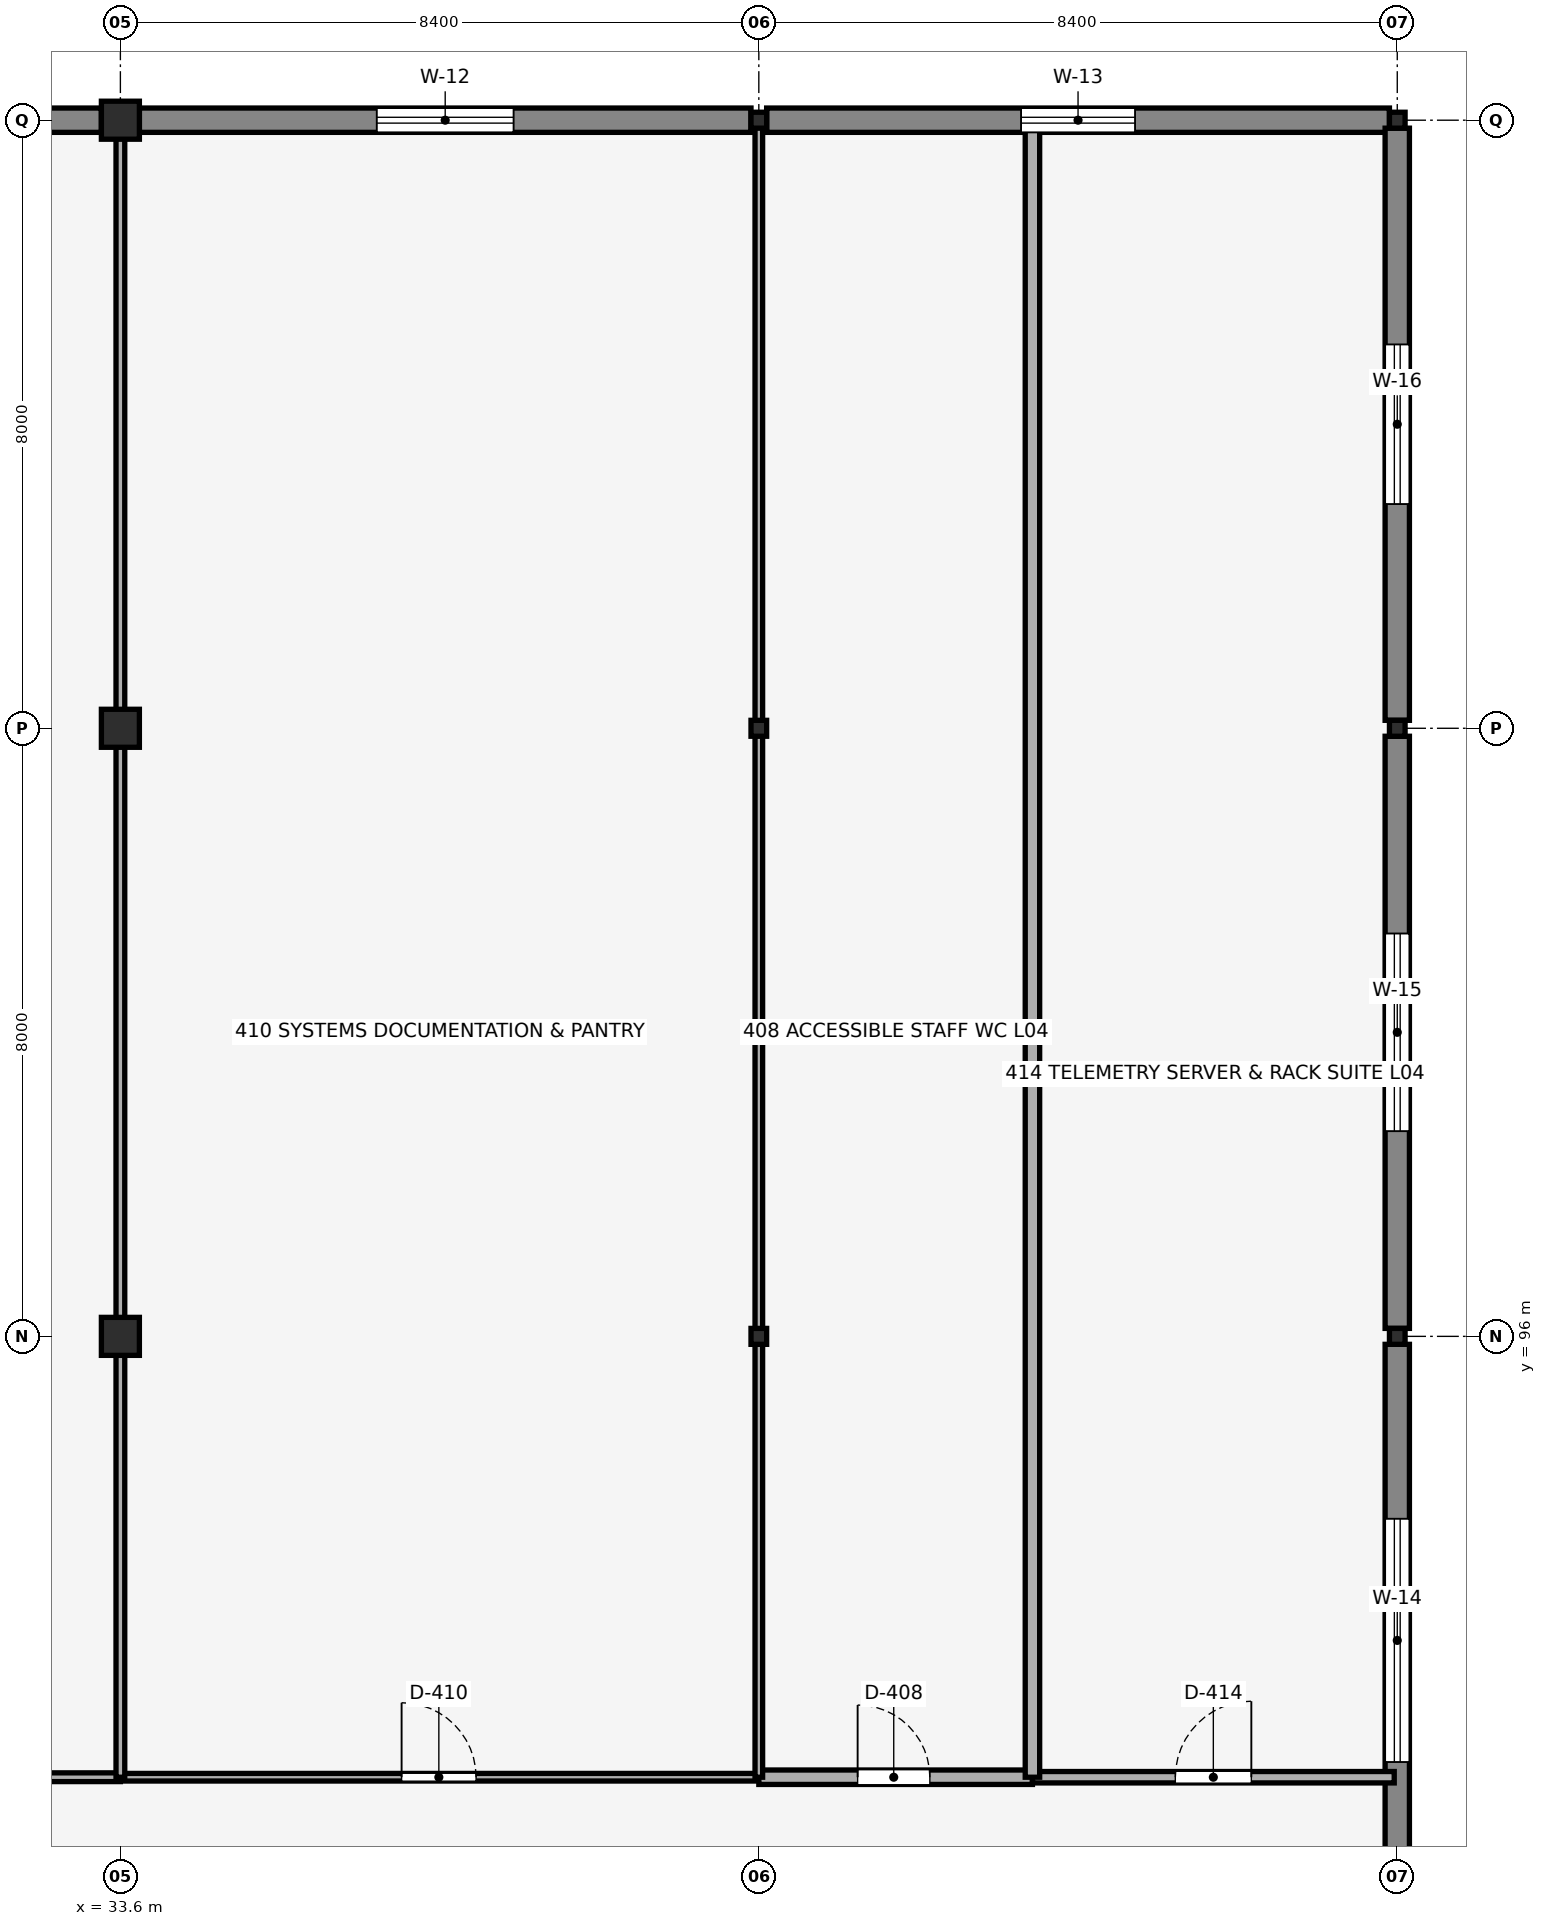
"""IFC4 building model, lengths in metres.
Left out: names, types, materials, properties, quantities, classifications, styles, units other than length and angle.
Written with IfcOpenShell. Run it as: python <this file> out.ifc"""

import sys

from ifc_helpers import new_model, si_unit, direction, frame, frame_2d, origin, origin_2d, place, context, subcontext, project, spatial, rectangle, i_section, extrude, element, fill, save


model = new_model("IFC4")
c1 = context("Model", 3, precision=1e-05, world=origin(), true_north=direction((0.0, 1.0)))
c2 = subcontext(c1, "Body", "Model", "MODEL_VIEW")
j1 = project(units=[si_unit("LENGTHUNIT", "METRE"), si_unit("PLANEANGLEUNIT", "RADIAN")], contexts=[c1])
p1 = place(None, origin())
s1 = spatial("IfcSite", under=j1, at=p1, CompositionType="ELEMENT")
p2 = place(p1, origin())
s2 = spatial("IfcBuilding", under=s1, at=p2, CompositionType="ELEMENT")
p3 = place(p2, frame((0.0, 0.0, 17.2)))
s3 = spatial("IfcBuildingStorey", under=s2, at=p3, CompositionType="ELEMENT", Elevation=17.2)
for number, where, z_axis, x_axis in (
    (1, (33.6, 96.0, 0.0), (0.0, 0.0, 1.0), (1.0, 0.0, 0.0)),
    (2, (33.6, 104.0, 0.0), (0.0, 0.0, 1.0), (1.0, 0.0, 0.0)),
    (3, (33.6, 112.0, 0.0), (0.0, 0.0, 1.0), (1.0, 0.0, 0.0)),
):
    element("IfcColumn", number, at=place(p3, frame(where, z_axis=z_axis, x_axis=x_axis)), inside=s3, PredefinedType="COLUMN", context=c2, shape_type="SweptSolid", body=[
        extrude(rectangle(XDim=0.5, YDim=0.5, at=origin_2d()), origin(), (0.0, 0.0, 1.0), 3.59),
    ])
for number, where, z_axis, x_axis in (
    (4, (42.0, 96.0, 0.0), (0.0, 0.0, 1.0), (1.0, 0.0, 0.0)),
    (5, (42.0, 104.0, 0.0), (0.0, 0.0, 1.0), (1.0, 0.0, 0.0)),
    (6, (42.0, 112.0, 0.0), (0.0, 0.0, 1.0), (1.0, 0.0, 0.0)),
    (7, (50.4, 96.0, 0.0), (0.0, 0.0, 1.0), (1.0, 0.0, 0.0)),
    (8, (50.4, 104.0, 0.0), (0.0, 0.0, 1.0), (1.0, 0.0, 0.0)),
    (9, (50.4, 112.0, 0.0), (0.0, 0.0, 1.0), (1.0, 0.0, 0.0)),
):
    element("IfcColumn", number, at=place(p3, frame(where, z_axis=z_axis, x_axis=x_axis)), inside=s3, PredefinedType="COLUMN", context=c2, shape_type="SweptSolid", body=[
        extrude(i_section(OverallWidth=0.206, OverallDepth=0.21, WebThickness=0.01, FlangeThickness=0.014, FilletRadius=0.01, at=origin_2d()), origin(), (0.0, 0.0, 1.0), 3.59),
    ])
p4 = place(p3, frame((25.303, 112.0, 0.0), z_axis=(0.0, 0.0, 1.0), x_axis=(1.0, 0.0, 0.0)))
e10 = element("IfcWall", 10, at=p4, inside=s3, PredefinedType="SOLIDWALL", context=c2, shape_type="SweptSolid", body=[
    extrude(rectangle(XDim=8.047, YDim=0.32, at=frame_2d((4.023, 0.0))), origin(), (0.0, 0.0, 1.0), 3.33),
])
p5 = place(p4, frame((3.124, 0.0, 0.9), z_axis=(0.0, 0.0, 1.0), x_axis=(1.0, 0.0, 0.0)))
e11 = element("IfcOpeningElement", 11, at=p5, cuts=e10, PredefinedType="OPENING", context=c2, shape_type="SweptSolid", body=[
    extrude(rectangle(XDim=1.8, YDim=1.45, at=frame_2d((0.9, 0.725))), frame((0.0, 0.17, 0.0), z_axis=(0.0, -1.0, 0.0), x_axis=(1.0, 0.0, 0.0)), (0.0, 0.0, 1.0), 0.34),
])
p6 = place(p3, frame((33.85, 112.0, 0.0), z_axis=(0.0, 0.0, 1.0), x_axis=(1.0, 0.0, 0.0)))
e12 = element("IfcWall", 12, at=p6, inside=s3, PredefinedType="SOLIDWALL", context=c2, shape_type="SweptSolid", body=[
    extrude(rectangle(XDim=8.047, YDim=0.32, at=frame_2d((4.023, 0.0))), origin(), (0.0, 0.0, 1.0), 3.33),
])
p7 = place(p6, frame((3.124, 0.0, 0.9), z_axis=(0.0, 0.0, 1.0), x_axis=(1.0, 0.0, 0.0)))
e13 = element("IfcOpeningElement", 13, at=p7, cuts=e12, PredefinedType="OPENING", context=c2, shape_type="SweptSolid", body=[
    extrude(rectangle(XDim=1.8, YDim=1.3, at=frame_2d((0.9, 0.65))), frame((0.0, 0.17, 0.0), z_axis=(0.0, -1.0, 0.0), x_axis=(1.0, 0.0, 0.0)), (0.0, 0.0, 1.0), 0.34),
])
p8 = place(p3, frame((42.103, 112.0, 0.0), z_axis=(0.0, 0.0, 1.0), x_axis=(1.0, 0.0, 0.0)))
e14 = element("IfcWall", 14, at=p8, inside=s3, PredefinedType="SOLIDWALL", context=c2, shape_type="SweptSolid", body=[
    extrude(rectangle(XDim=8.194, YDim=0.32, at=frame_2d((4.097, 0.0))), origin(), (0.0, 0.0, 1.0), 3.33),
])
p9 = place(p8, frame((3.347, 0.0, 0.9), z_axis=(0.0, 0.0, 1.0), x_axis=(1.0, 0.0, 0.0)))
e15 = element("IfcOpeningElement", 15, at=p9, cuts=e14, PredefinedType="OPENING", context=c2, shape_type="SweptSolid", body=[
    extrude(rectangle(XDim=1.5, YDim=1.4, at=frame_2d((0.75, 0.7))), frame((0.0, 0.17, 0.0), z_axis=(0.0, -1.0, 0.0), x_axis=(1.0, 0.0, 0.0)), (0.0, 0.0, 1.0), 0.34),
])
p10 = place(p3, frame((50.4, 88.105, 0.0), z_axis=(0.0, 0.0, 1.0), x_axis=(0.0, 1.0, 0.0)))
e16 = element("IfcWall", 16, at=p10, inside=s3, PredefinedType="SOLIDWALL", context=c2, shape_type="SweptSolid", body=[
    extrude(rectangle(XDim=7.791, YDim=0.32, at=frame_2d((3.895, 0.0))), origin(), (0.0, 0.0, 1.0), 3.29),
])
p11 = place(p10, frame((2.295, 0.0, 1.55), z_axis=(0.0, 0.0, 1.0), x_axis=(1.0, 0.0, 0.0)))
e17 = element("IfcOpeningElement", 17, at=p11, cuts=e16, PredefinedType="OPENING", context=c2, shape_type="SweptSolid", body=[
    extrude(rectangle(XDim=3.2, YDim=0.9, at=frame_2d((1.6, 0.45))), frame((0.0, 0.17, 0.0), z_axis=(0.0, -1.0, 0.0), x_axis=(1.0, 0.0, 0.0)), (0.0, 0.0, 1.0), 0.34),
])
p12 = place(p3, frame((50.4, 96.105, 0.0), z_axis=(0.0, 0.0, 1.0), x_axis=(0.0, 1.0, 0.0)))
e18 = element("IfcWall", 18, at=p12, inside=s3, PredefinedType="SOLIDWALL", context=c2, shape_type="SweptSolid", body=[
    extrude(rectangle(XDim=7.791, YDim=0.32, at=frame_2d((3.895, 0.0))), origin(), (0.0, 0.0, 1.0), 3.29),
])
p13 = place(p12, frame((2.595, 0.0, 1.55), z_axis=(0.0, 0.0, 1.0), x_axis=(1.0, 0.0, 0.0)))
e19 = element("IfcOpeningElement", 19, at=p13, cuts=e18, PredefinedType="OPENING", context=c2, shape_type="SweptSolid", body=[
    extrude(rectangle(XDim=2.6, YDim=0.85, at=frame_2d((1.3, 0.425))), frame((0.0, 0.17, 0.0), z_axis=(0.0, -1.0, 0.0), x_axis=(1.0, 0.0, 0.0)), (0.0, 0.0, 1.0), 0.34),
])
p14 = place(p3, frame((50.4, 104.105, 0.0), z_axis=(0.0, 0.0, 1.0), x_axis=(0.0, 1.0, 0.0)))
e20 = element("IfcWall", 20, at=p14, inside=s3, PredefinedType="SOLIDWALL", context=c2, shape_type="SweptSolid", body=[
    extrude(rectangle(XDim=7.791, YDim=0.32, at=frame_2d((3.895, 0.0))), origin(), (0.0, 0.0, 1.0), 3.29),
])
p15 = place(p14, frame((2.845, 0.0, 1.55), z_axis=(0.0, 0.0, 1.0), x_axis=(1.0, 0.0, 0.0)))
e21 = element("IfcOpeningElement", 21, at=p15, cuts=e20, PredefinedType="OPENING", context=c2, shape_type="SweptSolid", body=[
    extrude(rectangle(XDim=2.1, YDim=0.8, at=frame_2d((1.05, 0.4))), frame((0.0, 0.17, 0.0), z_axis=(0.0, -1.0, 0.0), x_axis=(1.0, 0.0, 0.0)), (0.0, 0.0, 1.0), 0.34),
])
p16 = place(p3, frame((16.8, 90.2, 0.0), z_axis=(0.0, 0.0, 1.0), x_axis=(1.0, 0.0, 0.0)))
e22 = element("IfcWall", 22, at=p16, inside=s3, PredefinedType="PARTITIONING", context=c2, shape_type="SweptSolid", body=[
    extrude(rectangle(XDim=16.8, YDim=0.115, at=frame_2d((8.4, 0.0))), origin(), (0.0, 0.0, 1.0), 3.137),
])
p17 = place(p16, frame((3.7, 0.0, 0.0), z_axis=(0.0, 0.0, 1.0), x_axis=(1.0, 0.0, 0.0)))
e23 = element("IfcOpeningElement", 23, at=p17, cuts=e22, PredefinedType="OPENING", context=c2, shape_type="SweptSolid", body=[
    extrude(rectangle(XDim=0.88, YDim=2.1, at=frame_2d((0.44, 1.05))), frame((0.0, 0.067, 0.0), z_axis=(0.0, -1.0, 0.0), x_axis=(1.0, 0.0, 0.0)), (0.0, 0.0, 1.0), 0.135),
])
p18 = place(p3, frame((33.6, 90.2, 0.0), z_axis=(0.0, 0.0, 1.0), x_axis=(1.0, 0.0, 0.0)))
e24 = element("IfcWall", 24, at=p18, inside=s3, PredefinedType="PARTITIONING", context=c2, shape_type="SweptSolid", body=[
    extrude(rectangle(XDim=8.4, YDim=0.1, at=frame_2d((4.2, 0.0))), origin(), (0.0, 0.0, 1.0), 3.59),
])
p19 = place(p18, frame((3.7, 0.0, 0.0), z_axis=(0.0, 0.0, 1.0), x_axis=(1.0, 0.0, 0.0)))
e25 = element("IfcOpeningElement", 25, at=p19, cuts=e24, PredefinedType="OPENING", context=c2, shape_type="SweptSolid", body=[
    extrude(rectangle(XDim=0.98, YDim=2.15, at=frame_2d((0.49, 1.075))), frame((0.0, 0.06, 0.0), z_axis=(0.0, -1.0, 0.0), x_axis=(1.0, 0.0, 0.0)), (0.0, 0.0, 1.0), 0.12),
])
p20 = place(p3, frame((42.0, 90.2, 0.0), z_axis=(0.0, 0.0, 1.0), x_axis=(1.0, 0.0, 0.0)))
e26 = element("IfcWall", 26, at=p20, inside=s3, PredefinedType="PLUMBINGWALL", context=c2, shape_type="SweptSolid", body=[
    extrude(rectangle(XDim=3.6, YDim=0.19, at=frame_2d((1.8, 0.0))), origin(), (0.0, 0.0, 1.0), 3.59),
])
p21 = place(p20, frame((1.3, 0.0, 0.0), z_axis=(0.0, 0.0, 1.0), x_axis=(1.0, 0.0, 0.0)))
e27 = element("IfcOpeningElement", 27, at=p21, cuts=e26, PredefinedType="OPENING", context=c2, shape_type="SweptSolid", body=[
    extrude(rectangle(XDim=0.95, YDim=2.15, at=frame_2d((0.475, 1.075))), frame((0.0, 0.105, 0.0), z_axis=(0.0, -1.0, 0.0), x_axis=(1.0, 0.0, 0.0)), (0.0, 0.0, 1.0), 0.21),
])
p22 = place(p3, frame((45.6, 90.2, 0.0), z_axis=(0.0, 0.0, 1.0), x_axis=(1.0, 0.0, 0.0)))
e28 = element("IfcWall", 28, at=p22, inside=s3, PredefinedType="PARTITIONING", context=c2, shape_type="SweptSolid", body=[
    extrude(rectangle(XDim=4.76, YDim=0.15, at=frame_2d((2.38, 0.0))), origin(), (0.0, 0.0, 1.0), 3.59),
])
p23 = place(p22, frame((1.88, 0.0, 0.0), z_axis=(0.0, 0.0, 1.0), x_axis=(1.0, 0.0, 0.0)))
e29 = element("IfcOpeningElement", 29, at=p23, cuts=e28, PredefinedType="OPENING", context=c2, shape_type="SweptSolid", body=[
    extrude(rectangle(XDim=1.0, YDim=2.15, at=frame_2d((0.5, 1.075))), frame((0.0, 0.085, 0.0), z_axis=(0.0, -1.0, 0.0), x_axis=(1.0, 0.0, 0.0)), (0.0, 0.0, 1.0), 0.17),
])
p24 = place(p3, frame((33.6, 90.2, 0.0), z_axis=(0.0, 0.0, 1.0), x_axis=(0.0, 1.0, 0.0)))
e30 = element("IfcWall", 30, at=p24, inside=s3, PredefinedType="PARTITIONING", context=c2, shape_type="SweptSolid", body=[
    extrude(rectangle(XDim=5.56, YDim=0.115, at=frame_2d((2.78, 0.0))), origin(), (0.0, 0.0, 1.0), 3.137),
])
for number, where, z_axis, x_axis in (
    (31, (33.6, 96.24, 0.0), (0.0, 0.0, 1.0), (0.0, 1.0, 0.0)),
    (32, (33.6, 104.24, 0.0), (0.0, 0.0, 1.0), (0.0, 1.0, 0.0)),
):
    element("IfcWall", number, at=place(p3, frame(where, z_axis=z_axis, x_axis=x_axis)), inside=s3, PredefinedType="PARTITIONING", context=c2, shape_type="SweptSolid", body=[
        extrude(rectangle(XDim=7.52, YDim=0.115, at=frame_2d((3.76, 0.0))), origin(), (0.0, 0.0, 1.0), 3.137),
    ])
p25 = place(p3, frame((42.0, 90.2, 0.0), z_axis=(0.0, 0.0, 1.0), x_axis=(0.0, 1.0, 0.0)))
e33 = element("IfcWall", 33, at=p25, inside=s3, PredefinedType="PARTITIONING", context=c2, shape_type="SweptSolid", body=[
    extrude(rectangle(XDim=5.705, YDim=0.1, at=frame_2d((2.853, 0.0))), origin(), (0.0, 0.0, 1.0), 3.137),
])
for number, where, z_axis, x_axis in (
    (34, (42.0, 96.095, 0.0), (0.0, 0.0, 1.0), (0.0, 1.0, 0.0)),
    (35, (42.0, 104.095, 0.0), (0.0, 0.0, 1.0), (0.0, 1.0, 0.0)),
):
    element("IfcWall", number, at=place(p3, frame(where, z_axis=z_axis, x_axis=x_axis)), inside=s3, PredefinedType="PARTITIONING", context=c2, shape_type="SweptSolid", body=[
        extrude(rectangle(XDim=7.811, YDim=0.1, at=frame_2d((3.905, 0.0))), origin(), (0.0, 0.0, 1.0), 3.137),
    ])
p26 = place(p3, frame((45.6, 90.2, 0.0), z_axis=(0.0, 0.0, 1.0), x_axis=(0.0, 1.0, 0.0)))
e36 = element("IfcWall", 36, at=p26, inside=s3, PredefinedType="PLUMBINGWALL", context=c2, shape_type="SweptSolid", body=[
    extrude(rectangle(XDim=21.76, YDim=0.19, at=frame_2d((10.88, 0.0))), origin(), (0.0, 0.0, 1.0), 3.59),
])
p27 = place(p7, origin())
e37 = element("IfcWindow", 37, at=p27, inside=s3, PartitioningType="DOUBLE_PANEL_VERTICAL", PredefinedType="WINDOW", context=c2, shape_type="SweptSolid", body=[
    extrude(rectangle(XDim=1.8, YDim=1.3, at=frame_2d((0.9, 0.65))), frame((0.0, 0.03, 0.0), z_axis=(0.0, -1.0, 0.0), x_axis=(1.0, 0.0, 0.0)), (0.0, 0.0, 1.0), 0.06),
])
fill(e13, e37)
p28 = place(p9, origin())
e38 = element("IfcWindow", 38, at=p28, inside=s3, PartitioningType="SINGLE_PANEL", PredefinedType="WINDOW", context=c2, shape_type="SweptSolid", body=[
    extrude(rectangle(XDim=1.5, YDim=1.4, at=frame_2d((0.75, 0.7))), frame((0.0, 0.03, 0.0), z_axis=(0.0, -1.0, 0.0), x_axis=(1.0, 0.0, 0.0)), (0.0, 0.0, 1.0), 0.06),
])
fill(e15, e38)
p29 = place(p11, origin())
e39 = element("IfcWindow", 39, at=p29, inside=s3, PartitioningType="TRIPLE_PANEL_HORIZONTAL", PredefinedType="WINDOW", context=c2, shape_type="SweptSolid", body=[
    extrude(rectangle(XDim=3.2, YDim=0.9, at=frame_2d((1.6, 0.45))), frame((0.0, 0.03, 0.0), z_axis=(0.0, -1.0, 0.0), x_axis=(1.0, 0.0, 0.0)), (0.0, 0.0, 1.0), 0.06),
])
fill(e17, e39)
p30 = place(p13, origin())
e40 = element("IfcWindow", 40, at=p30, inside=s3, PartitioningType="DOUBLE_PANEL_HORIZONTAL", PredefinedType="WINDOW", context=c2, shape_type="SweptSolid", body=[
    extrude(rectangle(XDim=2.6, YDim=0.85, at=frame_2d((1.3, 0.425))), frame((0.0, 0.03, 0.0), z_axis=(0.0, -1.0, 0.0), x_axis=(1.0, 0.0, 0.0)), (0.0, 0.0, 1.0), 0.06),
])
fill(e19, e40)
p31 = place(p15, origin())
e41 = element("IfcWindow", 41, at=p31, inside=s3, PartitioningType="DOUBLE_PANEL_HORIZONTAL", PredefinedType="WINDOW", context=c2, shape_type="SweptSolid", body=[
    extrude(rectangle(XDim=2.1, YDim=0.8, at=frame_2d((1.05, 0.4))), frame((0.0, 0.03, 0.0), z_axis=(0.0, -1.0, 0.0), x_axis=(1.0, 0.0, 0.0)), (0.0, 0.0, 1.0), 0.06),
])
fill(e21, e41)
p32 = place(p19, origin())
e42 = element("IfcDoor", 42, at=p32, inside=s3, OperationType="SINGLE_SWING_LEFT", PredefinedType="DOOR", context=c2, shape_type="SweptSolid", body=[
    extrude(rectangle(XDim=0.98, YDim=2.15, at=frame_2d((0.49, 1.075))), frame((0.0, 0.025, 0.0), z_axis=(0.0, -1.0, 0.0), x_axis=(1.0, 0.0, 0.0)), (0.0, 0.0, 1.0), 0.05),
])
fill(e25, e42)
p33 = place(p21, origin())
e43 = element("IfcDoor", 43, at=p33, inside=s3, OperationType="SINGLE_SWING_LEFT", PredefinedType="DOOR", context=c2, shape_type="SweptSolid", body=[
    extrude(rectangle(XDim=0.95, YDim=2.15, at=frame_2d((0.475, 1.075))), frame((0.0, 0.025, 0.0), z_axis=(0.0, -1.0, 0.0), x_axis=(1.0, 0.0, 0.0)), (0.0, 0.0, 1.0), 0.05),
])
fill(e27, e43)
p34 = place(p23, origin())
e44 = element("IfcDoor", 44, at=p34, inside=s3, OperationType="SINGLE_SWING_RIGHT", PredefinedType="DOOR", context=c2, shape_type="SweptSolid", body=[
    extrude(rectangle(XDim=1.0, YDim=2.15, at=frame_2d((0.5, 1.075))), frame((0.0, 0.025, 0.0), z_axis=(0.0, -1.0, 0.0), x_axis=(1.0, 0.0, 0.0)), (0.0, 0.0, 1.0), 0.05),
])
fill(e29, e44)
save(model, sys.argv[1])
